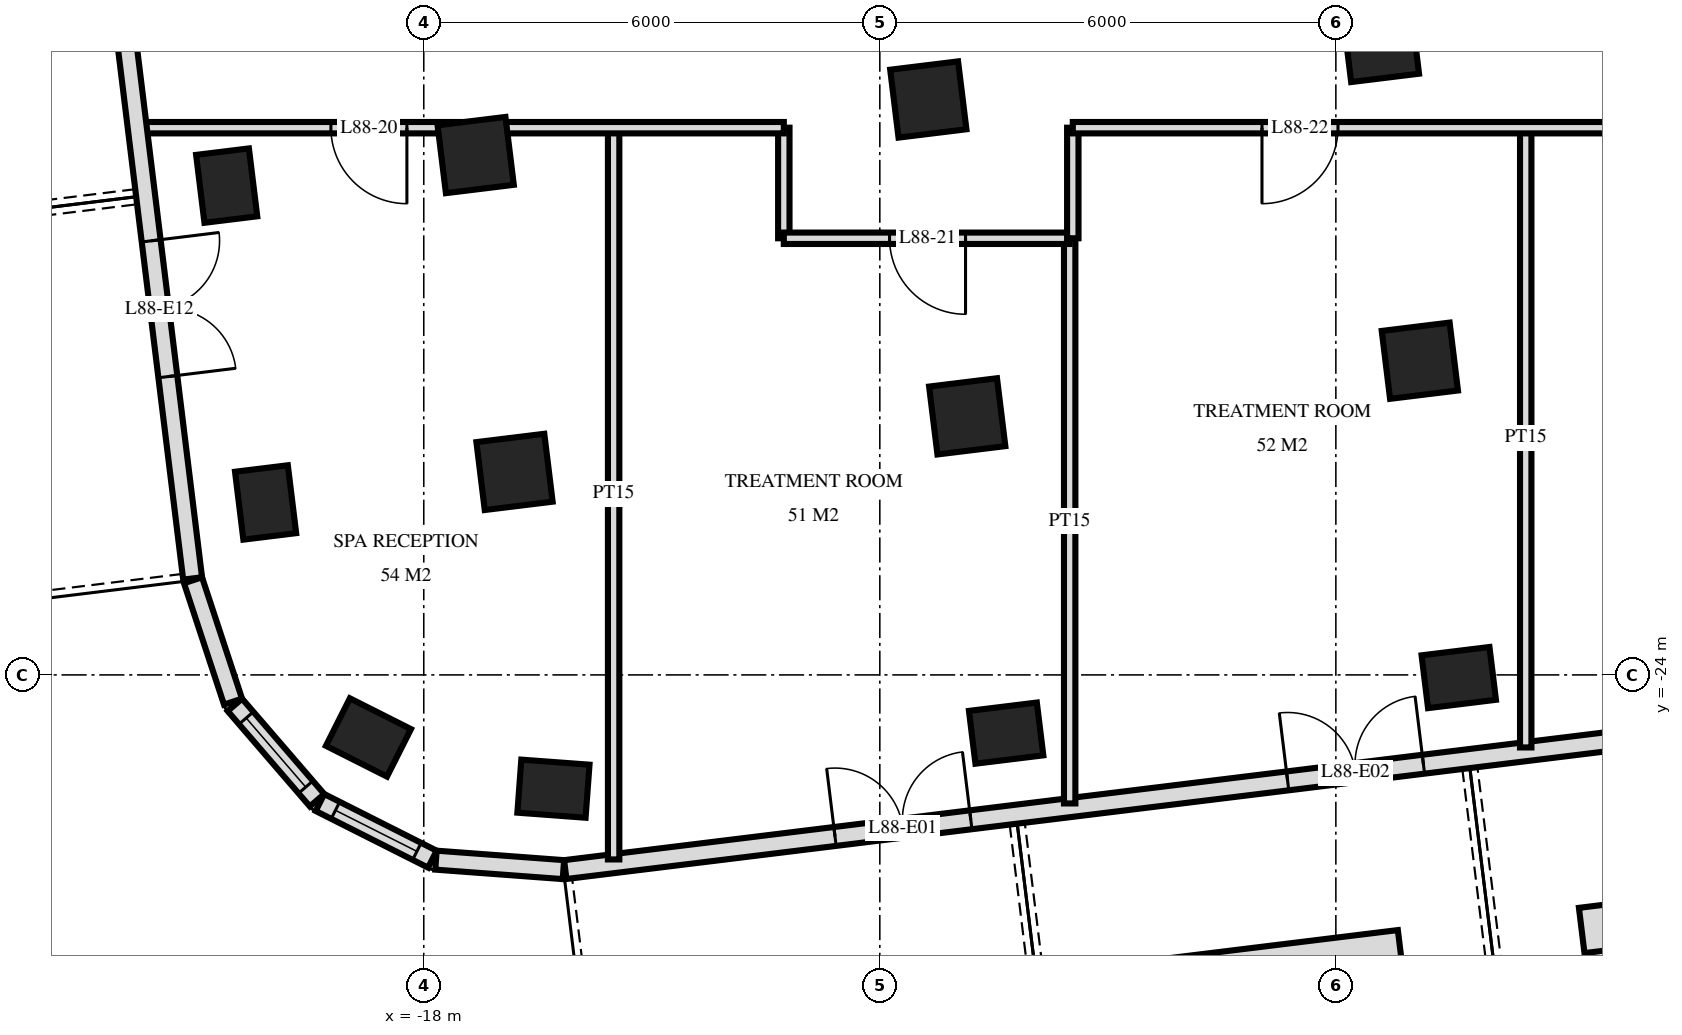
"""IFC4 building model, lengths in metres.
Left out: names, types, materials, properties, quantities, classifications, styles, units other than length and angle.
Written with IfcOpenShell. Run it as: python <this file> out.ifc"""

import sys

from ifc_helpers import new_model, si_unit, direction, frame, frame_2d, origin, origin_2d, place, context, subcontext, project, spatial, rectangle, extrude, element, fill, save


model = new_model("IFC4")
c1 = context("Model", 3, precision=1e-05, world=origin(), true_north=direction((0.0, 1.0)))
c2 = subcontext(c1, "Body", "Model", "MODEL_VIEW")
j1 = project(units=[si_unit("LENGTHUNIT", "METRE"), si_unit("PLANEANGLEUNIT", "RADIAN")], contexts=[c1])
p1 = place(None, origin())
s1 = spatial("IfcSite", under=j1, at=p1, CompositionType="ELEMENT")
p2 = place(p1, origin())
s2 = spatial("IfcBuilding", under=s1, at=p2, CompositionType="ELEMENT")
p3 = place(p2, frame((0.0, 0.0, 334.6)))
s3 = spatial("IfcBuildingStorey", under=s2, at=p3, CompositionType="ELEMENT", Elevation=334.6)
for number, where, z_axis, x_axis in (
    (1, (-20.593, -17.562, 0.0), (0.0, 0.0, 1.0), (-0.122, 0.993, 0.0)),
    (2, (-20.081, -21.731, 0.0), (0.0, 0.0, 1.0), (-0.122, 0.993, 0.0)),
    (3, (-18.728, -24.823, 0.0), (0.0, 0.0, 1.0), (-0.893, 0.45, 0.0)),
):
    element("IfcColumn", number, at=place(p3, frame(where, z_axis=z_axis, x_axis=x_axis)), inside=s3, PredefinedType="COLUMN", context=c2, shape_type="SweptSolid", body=[
        extrude(rectangle(XDim=0.9, YDim=0.7, at=origin_2d()), origin(), (0.0, 0.0, 1.0), 4.0),
    ])
for number, where, z_axis, x_axis in (
    (4, (-17.317, -17.16, 0.0), (0.0, 0.0, 1.0), (0.993, 0.122, 0.0)),
    (5, (-16.806, -21.329, 0.0), (0.0, 0.0, 1.0), (0.993, 0.122, 0.0)),
):
    element("IfcColumn", number, at=place(p3, frame(where, z_axis=z_axis, x_axis=x_axis)), inside=s3, PredefinedType="COLUMN", context=c2, shape_type="SweptSolid", body=[
        extrude(rectangle(XDim=0.9, YDim=0.9, at=origin_2d()), origin(), (0.0, 0.0, 1.0), 4.0),
    ])
p4 = place(p3, frame((-16.294, -25.497, 0.0), z_axis=(0.0, 0.0, 1.0), x_axis=(-0.997251478385, 0.074091084885, 0.0)))
e6 = element("IfcColumn", 6, at=p4, inside=s3, PredefinedType="COLUMN", context=c2, shape_type="SweptSolid", body=[
    extrude(rectangle(XDim=0.9, YDim=0.7, at=origin_2d()), origin(), (0.0, 0.0, 1.0), 4.0),
])
for number, where, z_axis, x_axis in (
    (7, (-11.362, -16.429, 0.0), (0.0, 0.0, 1.0), (0.993, 0.122, 0.0)),
    (8, (-10.85, -20.598, 0.0), (0.0, 0.0, 1.0), (0.993, 0.122, 0.0)),
):
    element("IfcColumn", number, at=place(p3, frame(where, z_axis=z_axis, x_axis=x_axis)), inside=s3, PredefinedType="COLUMN", context=c2, shape_type="SweptSolid", body=[
        extrude(rectangle(XDim=0.9, YDim=0.9, at=origin_2d()), origin(), (0.0, 0.0, 1.0), 4.0),
    ])
p5 = place(p3, frame((-10.338, -24.766, 0.0), z_axis=(0.0, 0.0, 1.0), x_axis=(0.992546151641, 0.121869343405, 0.0)))
e9 = element("IfcColumn", 9, at=p5, inside=s3, PredefinedType="COLUMN", context=c2, shape_type="SweptSolid", body=[
    extrude(rectangle(XDim=0.9, YDim=0.7, at=origin_2d()), origin(), (0.0, 0.0, 1.0), 4.0),
])
for number, where, z_axis, x_axis in (
    (10, (-5.407, -15.698, 0.0), (0.0, 0.0, 1.0), (0.993, 0.122, 0.0)),
    (11, (-4.895, -19.866, 0.0), (0.0, 0.0, 1.0), (0.993, 0.122, 0.0)),
):
    element("IfcColumn", number, at=place(p3, frame(where, z_axis=z_axis, x_axis=x_axis)), inside=s3, PredefinedType="COLUMN", context=c2, shape_type="SweptSolid", body=[
        extrude(rectangle(XDim=0.9, YDim=0.9, at=origin_2d()), origin(), (0.0, 0.0, 1.0), 4.0),
    ])
p6 = place(p3, frame((-4.383, -24.035, 0.0), z_axis=(0.0, 0.0, 1.0), x_axis=(0.992546151641, 0.121869343405, 0.0)))
e12 = element("IfcColumn", 12, at=p6, inside=s3, PredefinedType="COLUMN", context=c2, shape_type="SweptSolid", body=[
    extrude(rectangle(XDim=0.9, YDim=0.7, at=origin_2d()), origin(), (0.0, 0.0, 1.0), 4.0),
])
p7 = place(p3, frame((-23.375, -3.723, 0.0), z_axis=(0.0, 0.0, 1.0), x_axis=(0.121862878281, -0.992546945437, 0.0)))
e13 = element("IfcWall", 13, at=p7, inside=s3, PredefinedType="SOLIDWALL", context=c2, shape_type="SweptSolid", body=[
    extrude(rectangle(XDim=19.151, YDim=0.25, at=frame_2d((9.575, 0.0))), origin(), (0.0, 0.0, 1.0), 3.72),
])
p8 = place(p7, frame((0.575, 0.0, 0.0)))
e14 = element("IfcOpeningElement", 14, at=p8, cuts=e13, PredefinedType="OPENING", context=c2, shape_type="SweptSolid", body=[
    extrude(rectangle(XDim=1.8, YDim=2.4, at=frame_2d((0.9, 1.2))), frame((0.0, 0.135, 0.0), z_axis=(0.0, -1.0, 0.0), x_axis=(1.0, 0.0, 0.0)), (0.0, 0.0, 1.0), 0.27),
])
p9 = place(p7, frame((3.275, 0.0, 0.0)))
e15 = element("IfcOpeningElement", 15, at=p9, cuts=e13, PredefinedType="OPENING", context=c2, shape_type="SweptSolid", body=[
    extrude(rectangle(XDim=2.4, YDim=2.4, at=frame_2d((1.2, 1.2))), frame((0.0, 0.135, 0.0), z_axis=(0.0, -1.0, 0.0), x_axis=(1.0, 0.0, 0.0)), (0.0, 0.0, 1.0), 0.27),
])
p10 = place(p7, frame((6.576, 0.0, 0.0)))
e16 = element("IfcOpeningElement", 16, at=p10, cuts=e13, PredefinedType="OPENING", context=c2, shape_type="SweptSolid", body=[
    extrude(rectangle(XDim=1.8, YDim=2.4, at=frame_2d((0.9, 1.2))), frame((0.0, 0.135, 0.0), z_axis=(0.0, -1.0, 0.0), x_axis=(1.0, 0.0, 0.0)), (0.0, 0.0, 1.0), 0.27),
])
p11 = place(p7, frame((14.675, 0.0, 0.0)))
e17 = element("IfcOpeningElement", 17, at=p11, cuts=e13, PredefinedType="OPENING", context=c2, shape_type="SweptSolid", body=[
    extrude(rectangle(XDim=1.8, YDim=2.4, at=frame_2d((0.9, 1.2))), frame((0.0, 0.135, 0.0), z_axis=(0.0, -1.0, 0.0), x_axis=(1.0, 0.0, 0.0)), (0.0, 0.0, 1.0), 0.27),
])
p12 = place(p3, frame((-21.036, -22.755, 0.0), z_axis=(0.0, 0.0, 1.0), x_axis=(0.313046160822, -0.949737911844, 0.0)))
e18 = element("IfcWall", 18, at=p12, inside=s3, PredefinedType="SOLIDWALL", context=c2, shape_type="SweptSolid", body=[
    extrude(rectangle(XDim=1.681, YDim=0.25, at=frame_2d((0.841, 0.0))), origin(), (0.0, 0.0, 1.0), 3.72),
])
p13 = place(p3, frame((-20.485, -24.394, 0.0), z_axis=(0.0, 0.0, 1.0), x_axis=(0.652755886531, -0.757568315466, 0.0)))
e19 = element("IfcWall", 19, at=p13, inside=s3, PredefinedType="SOLIDWALL", context=c2, shape_type="SweptSolid", body=[
    extrude(rectangle(XDim=1.656, YDim=0.25, at=frame_2d((0.828, 0.0))), origin(), (0.0, 0.0, 1.0), 3.72),
])
p14 = place(p13, frame((0.228, 0.0, 0.9)))
e20 = element("IfcOpeningElement", 20, at=p14, cuts=e19, PredefinedType="OPENING", context=c2, shape_type="SweptSolid", body=[
    extrude(rectangle(XDim=1.2, YDim=1.5, at=frame_2d((0.6, 0.75))), frame((0.0, 0.135, 0.0), z_axis=(0.0, -1.0, 0.0), x_axis=(1.0, 0.0, 0.0)), (0.0, 0.0, 1.0), 0.27),
])
p15 = place(p3, frame((-19.366, -25.679, 0.0), z_axis=(0.0, 0.0, 1.0), x_axis=(0.893007580524, -0.450041621549, 0.0)))
e21 = element("IfcWall", 21, at=p15, inside=s3, PredefinedType="SOLIDWALL", context=c2, shape_type="SweptSolid", body=[
    extrude(rectangle(XDim=1.656, YDim=0.25, at=frame_2d((0.828, 0.0))), origin(), (0.0, 0.0, 1.0), 3.72),
])
p16 = place(p15, frame((0.228, 0.0, 0.9)))
e22 = element("IfcOpeningElement", 22, at=p16, cuts=e21, PredefinedType="OPENING", context=c2, shape_type="SweptSolid", body=[
    extrude(rectangle(XDim=1.2, YDim=1.5, at=frame_2d((0.6, 0.75))), frame((0.0, 0.135, 0.0), z_axis=(0.0, -1.0, 0.0), x_axis=(1.0, 0.0, 0.0)), (0.0, 0.0, 1.0), 0.27),
])
p17 = place(p3, frame((-17.84, -26.438, 0.0), z_axis=(0.0, 0.0, 1.0), x_axis=(0.997254267475, -0.074053534713, 0.0)))
e23 = element("IfcWall", 23, at=p17, inside=s3, PredefinedType="SOLIDWALL", context=c2, shape_type="SweptSolid", body=[
    extrude(rectangle(XDim=1.681, YDim=0.25, at=frame_2d((0.841, 0.0))), origin(), (0.0, 0.0, 1.0), 3.72),
])
p18 = place(p3, frame((-16.138, -26.561, 0.0), z_axis=(0.0, 0.0, 1.0), x_axis=(0.992546726876, 0.121864658405, 0.0)))
e24 = element("IfcWall", 24, at=p18, inside=s3, PredefinedType="SOLIDWALL", context=c2, shape_type="SweptSolid", body=[
    extrude(rectangle(XDim=35.951, YDim=0.25, at=frame_2d((17.975, 0.0))), origin(), (0.0, 0.0, 1.0), 3.72),
])
p19 = place(p18, frame((3.575, 0.0, 0.0)))
e25 = element("IfcOpeningElement", 25, at=p19, cuts=e24, PredefinedType="OPENING", context=c2, shape_type="SweptSolid", body=[
    extrude(rectangle(XDim=1.8, YDim=2.4, at=frame_2d((0.9, 1.2))), frame((0.0, 0.135, 0.0), z_axis=(0.0, -1.0, 0.0), x_axis=(1.0, 0.0, 0.0)), (0.0, 0.0, 1.0), 0.27),
])
p20 = place(p18, frame((9.575, 0.0, 0.0)))
e26 = element("IfcOpeningElement", 26, at=p20, cuts=e24, PredefinedType="OPENING", context=c2, shape_type="SweptSolid", body=[
    extrude(rectangle(XDim=1.8, YDim=2.4, at=frame_2d((0.9, 1.2))), frame((0.0, 0.135, 0.0), z_axis=(0.0, -1.0, 0.0), x_axis=(1.0, 0.0, 0.0)), (0.0, 0.0, 1.0), 0.27),
])
p21 = place(p18, frame((15.576, 0.0, 0.0)))
e27 = element("IfcOpeningElement", 27, at=p21, cuts=e24, PredefinedType="OPENING", context=c2, shape_type="SweptSolid", body=[
    extrude(rectangle(XDim=1.8, YDim=2.4, at=frame_2d((0.9, 1.2))), frame((0.0, 0.135, 0.0), z_axis=(0.0, -1.0, 0.0), x_axis=(1.0, 0.0, 0.0)), (0.0, 0.0, 1.0), 0.27),
])
p22 = place(p18, frame((21.575, 0.0, 0.0)))
e28 = element("IfcOpeningElement", 28, at=p22, cuts=e24, PredefinedType="OPENING", context=c2, shape_type="SweptSolid", body=[
    extrude(rectangle(XDim=1.8, YDim=2.4, at=frame_2d((0.9, 1.2))), frame((0.0, 0.135, 0.0), z_axis=(0.0, -1.0, 0.0), x_axis=(1.0, 0.0, 0.0)), (0.0, 0.0, 1.0), 0.27),
])
p23 = place(p18, frame((27.575, 0.0, 0.0)))
e29 = element("IfcOpeningElement", 29, at=p23, cuts=e24, PredefinedType="OPENING", context=c2, shape_type="SweptSolid", body=[
    extrude(rectangle(XDim=1.8, YDim=2.4, at=frame_2d((0.9, 1.2))), frame((0.0, 0.135, 0.0), z_axis=(0.0, -1.0, 0.0), x_axis=(1.0, 0.0, 0.0)), (0.0, 0.0, 1.0), 0.27),
])
p24 = place(p18, frame((33.575, 0.0, 0.0)))
e30 = element("IfcOpeningElement", 30, at=p24, cuts=e24, PredefinedType="OPENING", context=c2, shape_type="SweptSolid", body=[
    extrude(rectangle(XDim=1.8, YDim=2.4, at=frame_2d((0.9, 1.2))), frame((0.0, 0.135, 0.0), z_axis=(0.0, -1.0, 0.0), x_axis=(1.0, 0.0, 0.0)), (0.0, 0.0, 1.0), 0.27),
])
for number, where, z_axis, x_axis in (
    (31, (-5.148, -27.655, 0.0), (0.0, 0.0, 1.0), (-0.993, -0.122, 0.0)),
    (32, (0.808, -26.924, 0.0), (0.0, 0.0, 1.0), (-0.993, -0.122, 0.0)),
):
    element("IfcWall", number, at=place(p3, frame(where, z_axis=z_axis, x_axis=x_axis)), inside=s3, PredefinedType="USERDEFINED", context=c2, shape_type="SweptSolid", body=[
        extrude(rectangle(XDim=3.6, YDim=0.6, at=frame_2d((1.8, 0.0))), origin(), (0.0, 0.0, 1.0), 0.65),
    ])
p25 = place(p3, frame((-3.502, -24.955, 0.0), z_axis=(0.0, 0.0, 1.0), x_axis=(0.0, 1.0, 0.0)))
e33 = element("IfcWall", 33, at=p25, inside=s3, PredefinedType="PARTITIONING", context=c2, shape_type="SweptSolid", body=[
    extrude(rectangle(XDim=8.155, YDim=0.15, at=frame_2d((4.077, 0.0))), origin(), (0.0, 0.0, 1.0), 3.72),
])
p26 = place(p3, frame((-9.461, -18.255, 0.0), z_axis=(0.0, 0.0, 1.0), x_axis=(0.0, 1.0, 0.0)))
e34 = element("IfcWall", 34, at=p26, inside=s3, PredefinedType="PARTITIONING", context=c2, shape_type="SweptSolid", body=[
    extrude(rectangle(XDim=1.455, YDim=0.15, at=frame_2d((0.728, 0.0))), origin(), (0.0, 0.0, 1.0), 3.72),
])
p27 = place(p3, frame((-9.502, -25.691, 0.0), z_axis=(0.0, 0.0, 1.0), x_axis=(0.0, 1.0, 0.0)))
e35 = element("IfcWall", 35, at=p27, inside=s3, PredefinedType="PARTITIONING", context=c2, shape_type="SweptSolid", body=[
    extrude(rectangle(XDim=7.436, YDim=0.15, at=frame_2d((3.718, 0.0))), origin(), (0.0, 0.0, 1.0), 3.72),
])
p28 = place(p3, frame((-13.263, -18.255, 0.0), z_axis=(0.0, 0.0, 1.0), x_axis=(0.0, 1.0, 0.0)))
e36 = element("IfcWall", 36, at=p28, inside=s3, PredefinedType="PARTITIONING", context=c2, shape_type="SweptSolid", body=[
    extrude(rectangle(XDim=1.455, YDim=0.15, at=frame_2d((0.728, 0.0))), origin(), (0.0, 0.0, 1.0), 3.72),
])
p29 = place(p3, frame((-15.502, -26.428, 0.0), z_axis=(0.0, 0.0, 1.0), x_axis=(0.0, 1.0, 0.0)))
e37 = element("IfcWall", 37, at=p29, inside=s3, PredefinedType="PARTITIONING", context=c2, shape_type="SweptSolid", body=[
    extrude(rectangle(XDim=9.628, YDim=0.15, at=frame_2d((4.814, 0.0))), origin(), (0.0, 0.0, 1.0), 3.72),
])
p30 = place(p3, frame((-13.263, -18.255, 0.0), z_axis=(0.0, 0.0, 1.0), x_axis=(1.0, 0.0, 0.0)))
e38 = element("IfcWall", 38, at=p30, inside=s3, PredefinedType="PARTITIONING", context=c2, shape_type="SweptSolid", body=[
    extrude(rectangle(XDim=3.761, YDim=0.15, at=frame_2d((1.88, 0.0))), origin(), (0.0, 0.0, 1.0), 3.72),
])
p31 = place(p30, frame((1.391, 0.0, 0.0)))
e39 = element("IfcOpeningElement", 39, at=p31, cuts=e38, PredefinedType="OPENING", context=c2, shape_type="SweptSolid", body=[
    extrude(rectangle(XDim=1.0, YDim=2.1, at=frame_2d((0.5, 1.05))), frame((0.0, 0.085, 0.0), z_axis=(0.0, -1.0, 0.0), x_axis=(1.0, 0.0, 0.0)), (0.0, 0.0, 1.0), 0.17),
])
p32 = place(p3, frame((-21.714, -16.8, 0.0), z_axis=(0.0, 0.0, 1.0), x_axis=(1.0, 0.0, 0.0)))
e40 = element("IfcWall", 40, at=p32, inside=s3, PredefinedType="PARTITIONING", context=c2, shape_type="SweptSolid", body=[
    extrude(rectangle(XDim=8.451, YDim=0.15, at=frame_2d((4.226, 0.0))), origin(), (0.0, 0.0, 1.0), 3.72),
])
p33 = place(p32, frame((2.492, 0.0, 0.0)))
e41 = element("IfcOpeningElement", 41, at=p33, cuts=e40, PredefinedType="OPENING", context=c2, shape_type="SweptSolid", body=[
    extrude(rectangle(XDim=1.0, YDim=2.1, at=frame_2d((0.5, 1.05))), frame((0.0, 0.085, 0.0), z_axis=(0.0, -1.0, 0.0), x_axis=(1.0, 0.0, 0.0)), (0.0, 0.0, 1.0), 0.17),
])
p34 = place(p3, frame((-9.461, -16.8, 0.0), z_axis=(0.0, 0.0, 1.0), x_axis=(1.0, 0.0, 0.0)))
e42 = element("IfcWall", 42, at=p34, inside=s3, PredefinedType="PARTITIONING", context=c2, shape_type="SweptSolid", body=[
    extrude(rectangle(XDim=32.722, YDim=0.15, at=frame_2d((16.361, 0.0))), origin(), (0.0, 0.0, 1.0), 3.72),
])
p35 = place(p34, frame((2.489, 0.0, 0.0)))
e43 = element("IfcOpeningElement", 43, at=p35, cuts=e42, PredefinedType="OPENING", context=c2, shape_type="SweptSolid", body=[
    extrude(rectangle(XDim=1.0, YDim=2.1, at=frame_2d((0.5, 1.05))), frame((0.0, 0.085, 0.0), z_axis=(0.0, -1.0, 0.0), x_axis=(1.0, 0.0, 0.0)), (0.0, 0.0, 1.0), 0.17),
])
p36 = place(p34, frame((8.459, 0.0, 0.0)))
e44 = element("IfcOpeningElement", 44, at=p36, cuts=e42, PredefinedType="OPENING", context=c2, shape_type="SweptSolid", body=[
    extrude(rectangle(XDim=1.0, YDim=2.1, at=frame_2d((0.5, 1.05))), frame((0.0, 0.085, 0.0), z_axis=(0.0, -1.0, 0.0), x_axis=(1.0, 0.0, 0.0)), (0.0, 0.0, 1.0), 0.17),
])
p37 = place(p34, frame((14.439, 0.0, 0.0)))
e45 = element("IfcOpeningElement", 45, at=p37, cuts=e42, PredefinedType="OPENING", context=c2, shape_type="SweptSolid", body=[
    extrude(rectangle(XDim=1.0, YDim=2.1, at=frame_2d((0.5, 1.05))), frame((0.0, 0.085, 0.0), z_axis=(0.0, -1.0, 0.0), x_axis=(1.0, 0.0, 0.0)), (0.0, 0.0, 1.0), 0.17),
])
p38 = place(p34, frame((20.831, 0.0, 0.0)))
e46 = element("IfcOpeningElement", 46, at=p38, cuts=e42, PredefinedType="OPENING", context=c2, shape_type="SweptSolid", body=[
    extrude(rectangle(XDim=1.0, YDim=2.1, at=frame_2d((0.5, 1.05))), frame((0.0, 0.085, 0.0), z_axis=(0.0, -1.0, 0.0), x_axis=(1.0, 0.0, 0.0)), (0.0, 0.0, 1.0), 0.17),
])
p39 = place(p34, frame((28.989, 0.0, 0.0)))
e47 = element("IfcOpeningElement", 47, at=p39, cuts=e42, PredefinedType="OPENING", context=c2, shape_type="SweptSolid", body=[
    extrude(rectangle(XDim=1.0, YDim=2.1, at=frame_2d((0.5, 1.05))), frame((0.0, 0.085, 0.0), z_axis=(0.0, -1.0, 0.0), x_axis=(1.0, 0.0, 0.0)), (0.0, 0.0, 1.0), 0.17),
])
p40 = place(p14, origin())
e48 = element("IfcWindow", 48, at=p40, inside=s3, PartitioningType="SINGLE_PANEL", PredefinedType="WINDOW", context=c2, shape_type="SweptSolid", body=[
    extrude(rectangle(XDim=1.2, YDim=1.5, at=frame_2d((0.6, 0.75))), frame((0.0, 0.03, 0.0), z_axis=(0.0, -1.0, 0.0), x_axis=(1.0, 0.0, 0.0)), (0.0, 0.0, 1.0), 0.06),
])
fill(e20, e48)
p41 = place(p16, origin())
e49 = element("IfcWindow", 49, at=p41, inside=s3, PartitioningType="SINGLE_PANEL", PredefinedType="WINDOW", context=c2, shape_type="SweptSolid", body=[
    extrude(rectangle(XDim=1.2, YDim=1.5, at=frame_2d((0.6, 0.75))), frame((0.0, 0.03, 0.0), z_axis=(0.0, -1.0, 0.0), x_axis=(1.0, 0.0, 0.0)), (0.0, 0.0, 1.0), 0.06),
])
fill(e22, e49)
p42 = place(p19, origin())
e50 = element("IfcDoor", 50, at=p42, inside=s3, OperationType="DOUBLE_DOOR_SINGLE_SWING", PredefinedType="DOOR", context=c2, shape_type="SweptSolid", body=[
    extrude(rectangle(XDim=1.8, YDim=2.4, at=frame_2d((0.9, 1.2))), frame((0.0, 0.025, 0.0), z_axis=(0.0, -1.0, 0.0), x_axis=(1.0, 0.0, 0.0)), (0.0, 0.0, 1.0), 0.05),
])
fill(e25, e50)
p43 = place(p20, origin())
e51 = element("IfcDoor", 51, at=p43, inside=s3, OperationType="DOUBLE_DOOR_SINGLE_SWING", PredefinedType="DOOR", context=c2, shape_type="SweptSolid", body=[
    extrude(rectangle(XDim=1.8, YDim=2.4, at=frame_2d((0.9, 1.2))), frame((0.0, 0.025, 0.0), z_axis=(0.0, -1.0, 0.0), x_axis=(1.0, 0.0, 0.0)), (0.0, 0.0, 1.0), 0.05),
])
fill(e26, e51)
p44 = place(p11, origin())
e52 = element("IfcDoor", 52, at=p44, inside=s3, OperationType="DOUBLE_DOOR_SINGLE_SWING", PredefinedType="DOOR", context=c2, shape_type="SweptSolid", body=[
    extrude(rectangle(XDim=1.8, YDim=2.4, at=frame_2d((0.9, 1.2))), frame((0.0, 0.025, 0.0), z_axis=(0.0, -1.0, 0.0), x_axis=(1.0, 0.0, 0.0)), (0.0, 0.0, 1.0), 0.05),
])
fill(e17, e52)
p45 = place(p33, frame((0.5, 0.0, 0.0), z_axis=(0.0, 0.0, 1.0), x_axis=(-1.0, 0.0, 0.0)))
e53 = element("IfcDoor", 53, at=p45, inside=s3, OperationType="SINGLE_SWING_RIGHT", PredefinedType="DOOR", context=c2, shape_type="SweptSolid", body=[
    extrude(rectangle(XDim=1.0, YDim=2.1, at=frame_2d((0.0, 1.05))), frame((0.0, -0.025, 0.0), z_axis=(0.0, 1.0, 0.0), x_axis=(-1.0, 0.0, 0.0)), (0.0, 0.0, 1.0), 0.05),
])
fill(e41, e53)
p46 = place(p31, frame((0.5, 0.0, 0.0), z_axis=(0.0, 0.0, 1.0), x_axis=(-1.0, 0.0, 0.0)))
e54 = element("IfcDoor", 54, at=p46, inside=s3, OperationType="SINGLE_SWING_RIGHT", PredefinedType="DOOR", context=c2, shape_type="SweptSolid", body=[
    extrude(rectangle(XDim=1.0, YDim=2.1, at=frame_2d((0.0, 1.05))), frame((0.0, -0.025, 0.0), z_axis=(0.0, 1.0, 0.0), x_axis=(-1.0, 0.0, 0.0)), (0.0, 0.0, 1.0), 0.05),
])
fill(e39, e54)
p47 = place(p35, frame((0.5, 0.0, 0.0), z_axis=(0.0, 0.0, 1.0), x_axis=(-1.0, 0.0, 0.0)))
e55 = element("IfcDoor", 55, at=p47, inside=s3, OperationType="SINGLE_SWING_LEFT", PredefinedType="DOOR", context=c2, shape_type="SweptSolid", body=[
    extrude(rectangle(XDim=1.0, YDim=2.1, at=frame_2d((0.0, 1.05))), frame((0.0, -0.025, 0.0), z_axis=(0.0, 1.0, 0.0), x_axis=(-1.0, 0.0, 0.0)), (0.0, 0.0, 1.0), 0.05),
])
fill(e43, e55)
save(model, sys.argv[1])
